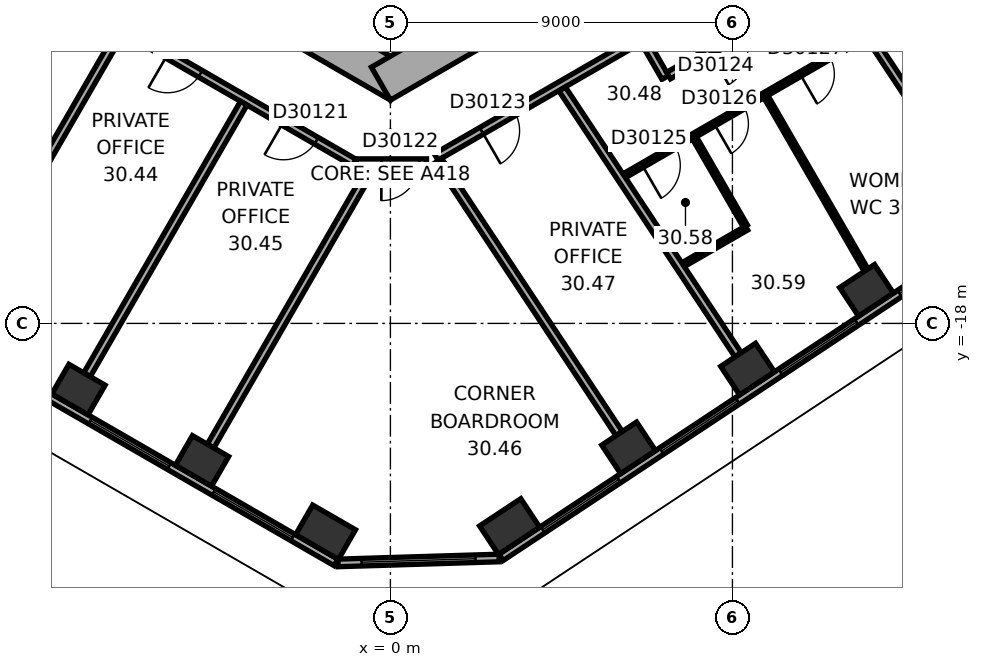
"""IFC4 building model, lengths in metres.
Left out: names, types, materials, properties, quantities, classifications, styles, units other than length and angle.
Written with IfcOpenShell. Run it as: python <this file> out.ifc"""

import sys

from ifc_helpers import new_model, si_unit, direction, frame, frame_2d, origin, origin_2d, place, context, subcontext, project, spatial, rectangle, extrude, element, fill, save


model = new_model("IFC4")
c1 = context("Model", 3, precision=1e-05, world=origin(), true_north=direction((0.0, 1.0)))
c2 = subcontext(c1, "Body", "Model", "MODEL_VIEW")
j1 = project(units=[si_unit("LENGTHUNIT", "METRE"), si_unit("PLANEANGLEUNIT", "RADIAN")], contexts=[c1])
p1 = place(None, origin())
s1 = spatial("IfcSite", under=j1, at=p1, CompositionType="ELEMENT")
p2 = place(p1, origin())
s2 = spatial("IfcBuilding", under=s1, at=p2, CompositionType="ELEMENT")
p3 = place(p2, frame((0.0, 0.0, 124.4)))
s3 = spatial("IfcBuildingStorey", under=s2, at=p3, CompositionType="ELEMENT", Elevation=124.4)
for number, where, z_axis, x_axis in (
    (1, (-8.208, -19.74, 0.0), (0.0, 0.0, 1.0), (0.866, -0.5, 0.0)),
    (2, (-4.958, -21.617, 0.0), (0.0, 0.0, 1.0), (0.866, -0.5, 0.0)),
):
    element("IfcColumn", number, at=place(p3, frame(where, z_axis=z_axis, x_axis=x_axis)), inside=s3, PredefinedType="COLUMN", context=c2, shape_type="SweptSolid", body=[
        extrude(rectangle(XDim=1.1, YDim=0.9, at=origin_2d()), origin(), (0.0, 0.0, 1.0), 3.7),
    ])
for number, where, z_axis, x_axis in (
    (3, (-1.706, -23.494, 0.0), (0.0, 0.0, 1.0), (0.866, -0.5, 0.0)),
    (4, (3.137, -23.346, 0.0), (0.0, 0.0, 1.0), (0.834, 0.552, 0.0)),
):
    element("IfcColumn", number, at=place(p3, frame(where, z_axis=z_axis, x_axis=x_axis)), inside=s3, PredefinedType="COLUMN", context=c2, shape_type="SweptSolid", body=[
        extrude(rectangle(XDim=1.3, YDim=0.9, at=origin_2d()), origin(), (0.0, 0.0, 1.0), 3.7),
    ])
for number, where, z_axis, x_axis in (
    (5, (6.268, -21.274, 0.0), (0.0, 0.0, 1.0), (0.834, 0.552, 0.0)),
    (6, (9.398, -19.202, 0.0), (0.0, 0.0, 1.0), (0.834, 0.552, 0.0)),
    (7, (12.529, -17.13, 0.0), (0.0, 0.0, 1.0), (0.834, 0.552, 0.0)),
):
    element("IfcColumn", number, at=place(p3, frame(where, z_axis=z_axis, x_axis=x_axis)), inside=s3, PredefinedType="COLUMN", context=c2, shape_type="SweptSolid", body=[
        extrude(rectangle(XDim=1.1, YDim=0.9, at=origin_2d()), origin(), (0.0, 0.0, 1.0), 3.7),
    ])
p4 = place(p3, frame((-10.25, -5.629, 0.0), z_axis=(0.0, 0.0, 1.0), x_axis=(0.866022616891, -0.50000482701, 0.0)))
e8 = element("IfcWall", 8, at=p4, inside=s3, PredefinedType="SHEAR", context=c2, shape_type="SweptSolid", body=[
    extrude(rectangle(XDim=12.125, YDim=1.0, at=frame_2d((6.062, 0.0))), origin(), (0.0, 0.0, 1.0), 3.7),
])
p5 = place(p4, frame((6.262, 0.0, 0.0)))
e9 = element("IfcOpeningElement", 9, at=p5, cuts=e8, PredefinedType="OPENING", context=c2, shape_type="SweptSolid", body=[
    extrude(rectangle(XDim=1.5, YDim=2.1, at=frame_2d((0.75, 1.05))), frame((0.0, 0.51, 0.0), z_axis=(0.0, -1.0, 0.0), x_axis=(1.0, 0.0, 0.0)), (0.0, 0.0, 1.0), 1.02),
])
p6 = place(p4, frame((1.812, 0.0, 0.0)))
e10 = element("IfcOpeningElement", 10, at=p6, cuts=e8, PredefinedType="OPENING", context=c2, shape_type="SweptSolid", body=[
    extrude(rectangle(XDim=0.9, YDim=2.1, at=frame_2d((0.45, 1.05))), frame((0.0, 0.51, 0.0), z_axis=(0.0, -1.0, 0.0), x_axis=(1.0, 0.0, 0.0)), (0.0, 0.0, 1.0), 1.02),
])
p7 = place(p4, frame((4.412, 0.0, 0.0)))
e11 = element("IfcOpeningElement", 11, at=p7, cuts=e8, PredefinedType="OPENING", context=c2, shape_type="SweptSolid", body=[
    extrude(rectangle(XDim=0.9, YDim=2.1, at=frame_2d((0.45, 1.05))), frame((0.0, 0.51, 0.0), z_axis=(0.0, -1.0, 0.0), x_axis=(1.0, 0.0, 0.0)), (0.0, 0.0, 1.0), 1.02),
])
p8 = place(p3, frame((-0.25, -11.691, 0.0), z_axis=(0.0, 0.0, 1.0), x_axis=(0.866022616891, 0.50000482701, 0.0)))
e12 = element("IfcWall", 12, at=p8, inside=s3, PredefinedType="SHEAR", context=c2, shape_type="SweptSolid", body=[
    extrude(rectangle(XDim=12.125, YDim=1.0, at=frame_2d((6.062, 0.0))), origin(), (0.0, 0.0, 1.0), 3.7),
])
p9 = place(p8, frame((4.012, 0.0, 0.0)))
e13 = element("IfcOpeningElement", 13, at=p9, cuts=e12, PredefinedType="OPENING", context=c2, shape_type="SweptSolid", body=[
    extrude(rectangle(XDim=0.9, YDim=2.1, at=frame_2d((0.45, 1.05))), frame((0.0, 0.51, 0.0), z_axis=(0.0, -1.0, 0.0), x_axis=(1.0, 0.0, 0.0)), (0.0, 0.0, 1.0), 1.02),
])
p10 = place(p8, frame((7.812, 0.0, 0.0)))
e14 = element("IfcOpeningElement", 14, at=p10, cuts=e12, PredefinedType="OPENING", context=c2, shape_type="SweptSolid", body=[
    extrude(rectangle(XDim=1.1, YDim=2.1, at=frame_2d((0.55, 1.05))), frame((0.0, 0.51, 0.0), z_axis=(0.0, -1.0, 0.0), x_axis=(1.0, 0.0, 0.0)), (0.0, 0.0, 1.0), 1.02),
])
p11 = place(p3, frame((-18.789, -14.267, 0.0), z_axis=(0.0, 0.0, 1.0), x_axis=(0.866023315909, -0.500003616288, 0.0)))
e15 = element("IfcWall", 15, at=p11, inside=s3, PredefinedType="STANDARD", context=c2, shape_type="SweptSolid", body=[
    extrude(rectangle(XDim=20.044, YDim=0.2, at=frame_2d((10.022, 0.0))), origin(), (0.0, 0.0, 1.0), 3.7),
])
p12 = place(p11, frame((1.314, 0.0, 0.9)))
e16 = element("IfcOpeningElement", 16, at=p12, cuts=e15, PredefinedType="OPENING", context=c2, shape_type="SweptSolid", body=[
    extrude(rectangle(XDim=2.4, YDim=2.0, at=frame_2d((1.2, 1.0))), frame((0.0, 0.11, 0.0), z_axis=(0.0, -1.0, 0.0), x_axis=(1.0, 0.0, 0.0)), (0.0, 0.0, 1.0), 0.22),
])
p13 = place(p11, frame((5.069, 0.0, 0.9)))
e17 = element("IfcOpeningElement", 17, at=p13, cuts=e15, PredefinedType="OPENING", context=c2, shape_type="SweptSolid", body=[
    extrude(rectangle(XDim=2.4, YDim=2.0, at=frame_2d((1.2, 1.0))), frame((0.0, 0.11, 0.0), z_axis=(0.0, -1.0, 0.0), x_axis=(1.0, 0.0, 0.0)), (0.0, 0.0, 1.0), 0.22),
])
p14 = place(p11, frame((8.823, 0.0, 0.9)))
e18 = element("IfcOpeningElement", 18, at=p14, cuts=e15, PredefinedType="OPENING", context=c2, shape_type="SweptSolid", body=[
    extrude(rectangle(XDim=2.4, YDim=2.0, at=frame_2d((1.2, 1.0))), frame((0.0, 0.11, 0.0), z_axis=(0.0, -1.0, 0.0), x_axis=(1.0, 0.0, 0.0)), (0.0, 0.0, 1.0), 0.22),
])
p15 = place(p11, frame((12.577, 0.0, 0.9)))
e19 = element("IfcOpeningElement", 19, at=p15, cuts=e15, PredefinedType="OPENING", context=c2, shape_type="SweptSolid", body=[
    extrude(rectangle(XDim=2.4, YDim=2.0, at=frame_2d((1.2, 1.0))), frame((0.0, 0.11, 0.0), z_axis=(0.0, -1.0, 0.0), x_axis=(1.0, 0.0, 0.0)), (0.0, 0.0, 1.0), 0.22),
])
p16 = place(p11, frame((16.331, 0.0, 0.9)))
e20 = element("IfcOpeningElement", 20, at=p16, cuts=e15, PredefinedType="OPENING", context=c2, shape_type="SweptSolid", body=[
    extrude(rectangle(XDim=2.4, YDim=2.0, at=frame_2d((1.2, 1.0))), frame((0.0, 0.11, 0.0), z_axis=(0.0, -1.0, 0.0), x_axis=(1.0, 0.0, 0.0)), (0.0, 0.0, 1.0), 0.22),
])
p17 = place(p3, frame((-1.378, -24.302, 0.0), z_axis=(0.0, 0.0, 1.0), x_axis=(0.999533857267, 0.030529791629, 0.0)))
e21 = element("IfcWall", 21, at=p17, inside=s3, PredefinedType="STANDARD", context=c2, shape_type="SweptSolid", body=[
    extrude(rectangle(XDim=4.238, YDim=0.2, at=frame_2d((2.119, 0.0))), origin(), (0.0, 0.0, 1.0), 3.7),
])
p18 = place(p17, frame((0.619, 0.0, 0.9)))
e22 = element("IfcOpeningElement", 22, at=p18, cuts=e21, PredefinedType="OPENING", context=c2, shape_type="SweptSolid", body=[
    extrude(rectangle(XDim=3.0, YDim=2.0, at=frame_2d((1.5, 1.0))), frame((0.0, 0.11, 0.0), z_axis=(0.0, -1.0, 0.0), x_axis=(1.0, 0.0, 0.0)), (0.0, 0.0, 1.0), 0.22),
])
p19 = place(p3, frame((2.911, -24.156, 0.0), z_axis=(0.0, 0.0, 1.0), x_axis=(0.833882163564, 0.551942512668, 0.0)))
e23 = element("IfcWall", 23, at=p19, inside=s3, PredefinedType="STANDARD", context=c2, shape_type="SweptSolid", body=[
    extrude(rectangle(XDim=20.044, YDim=0.2, at=frame_2d((10.022, 0.0))), origin(), (0.0, 0.0, 1.0), 3.7),
])
p20 = place(p19, frame((1.313, 0.0, 0.9)))
e24 = element("IfcOpeningElement", 24, at=p20, cuts=e23, PredefinedType="OPENING", context=c2, shape_type="SweptSolid", body=[
    extrude(rectangle(XDim=2.4, YDim=2.0, at=frame_2d((1.2, 1.0))), frame((0.0, 0.11, 0.0), z_axis=(0.0, -1.0, 0.0), x_axis=(1.0, 0.0, 0.0)), (0.0, 0.0, 1.0), 0.22),
])
p21 = place(p19, frame((5.067, 0.0, 0.9)))
e25 = element("IfcOpeningElement", 25, at=p21, cuts=e23, PredefinedType="OPENING", context=c2, shape_type="SweptSolid", body=[
    extrude(rectangle(XDim=2.4, YDim=2.0, at=frame_2d((1.2, 1.0))), frame((0.0, 0.11, 0.0), z_axis=(0.0, -1.0, 0.0), x_axis=(1.0, 0.0, 0.0)), (0.0, 0.0, 1.0), 0.22),
])
p22 = place(p19, frame((8.821, 0.0, 0.9)))
e26 = element("IfcOpeningElement", 26, at=p22, cuts=e23, PredefinedType="OPENING", context=c2, shape_type="SweptSolid", body=[
    extrude(rectangle(XDim=2.4, YDim=2.0, at=frame_2d((1.2, 1.0))), frame((0.0, 0.11, 0.0), z_axis=(0.0, -1.0, 0.0), x_axis=(1.0, 0.0, 0.0)), (0.0, 0.0, 1.0), 0.22),
])
p23 = place(p19, frame((12.575, 0.0, 0.9)))
e27 = element("IfcOpeningElement", 27, at=p23, cuts=e23, PredefinedType="OPENING", context=c2, shape_type="SweptSolid", body=[
    extrude(rectangle(XDim=2.4, YDim=2.0, at=frame_2d((1.2, 1.0))), frame((0.0, 0.11, 0.0), z_axis=(0.0, -1.0, 0.0), x_axis=(1.0, 0.0, 0.0)), (0.0, 0.0, 1.0), 0.22),
])
p24 = place(p19, frame((16.329, 0.0, 0.9)))
e28 = element("IfcOpeningElement", 28, at=p24, cuts=e23, PredefinedType="OPENING", context=c2, shape_type="SweptSolid", body=[
    extrude(rectangle(XDim=2.4, YDim=2.0, at=frame_2d((1.2, 1.0))), frame((0.0, 0.11, 0.0), z_axis=(0.0, -1.0, 0.0), x_axis=(1.0, 0.0, 0.0)), (0.0, 0.0, 1.0), 0.22),
])
p25 = place(p3, frame((-11.415, -7.728, 0.0), z_axis=(0.0, 0.0, 1.0), x_axis=(0.866022749921, -0.500004596598, 0.0)))
e29 = element("IfcWall", 29, at=p25, inside=s3, PredefinedType="PARTITIONING", context=c2, shape_type="SweptSolid", body=[
    extrude(rectangle(XDim=12.084, YDim=0.2, at=frame_2d((6.042, 0.0))), origin(), (0.0, 0.0, 1.0), 3.42),
])
p26 = place(p25, frame((2.652, 0.0, 0.0)))
e30 = element("IfcOpeningElement", 30, at=p26, cuts=e29, PredefinedType="OPENING", context=c2, shape_type="SweptSolid", body=[
    extrude(rectangle(XDim=1.0, YDim=2.1, at=frame_2d((0.5, 1.05))), frame((0.0, 0.11, 0.0), z_axis=(0.0, -1.0, 0.0), x_axis=(1.0, 0.0, 0.0)), (0.0, 0.0, 1.0), 0.22),
])
p27 = place(p25, frame((6.406, 0.0, 0.0)))
e31 = element("IfcOpeningElement", 31, at=p27, cuts=e29, PredefinedType="OPENING", context=c2, shape_type="SweptSolid", body=[
    extrude(rectangle(XDim=1.0, YDim=2.1, at=frame_2d((0.5, 1.05))), frame((0.0, 0.11, 0.0), z_axis=(0.0, -1.0, 0.0), x_axis=(1.0, 0.0, 0.0)), (0.0, 0.0, 1.0), 0.22),
])
p28 = place(p25, frame((9.934, 0.0, 0.0)))
e32 = element("IfcOpeningElement", 32, at=p28, cuts=e29, PredefinedType="OPENING", context=c2, shape_type="SweptSolid", body=[
    extrude(rectangle(XDim=1.0, YDim=2.1, at=frame_2d((0.5, 1.05))), frame((0.0, 0.11, 0.0), z_axis=(0.0, -1.0, 0.0), x_axis=(1.0, 0.0, 0.0)), (0.0, 0.0, 1.0), 0.22),
])
p29 = place(p3, frame((-11.235, -17.474, 0.0), z_axis=(0.0, 0.0, 1.0), x_axis=(0.499996545922, 0.866027397988, 0.0)))
e33 = element("IfcWall", 33, at=p29, inside=s3, PredefinedType="PARTITIONING", context=c2, shape_type="SweptSolid", body=[
    extrude(rectangle(XDim=8.25, YDim=0.2, at=frame_2d((4.125, 0.0))), origin(), (0.0, 0.0, 1.0), 2.87),
])
p30 = place(p3, frame((-7.984, -19.351, 0.0), z_axis=(0.0, 0.0, 1.0), x_axis=(0.500009360108, 0.866019999656, 0.0)))
e34 = element("IfcWall", 34, at=p30, inside=s3, PredefinedType="PARTITIONING", context=c2, shape_type="SweptSolid", body=[
    extrude(rectangle(XDim=8.25, YDim=0.2, at=frame_2d((4.125, 0.0))), origin(), (0.0, 0.0, 1.0), 3.42),
])
p31 = place(p3, frame((-4.732, -21.228, 0.0), z_axis=(0.0, 0.0, 1.0), x_axis=(0.500000843414, 0.866024916838, 0.0)))
e35 = element("IfcWall", 35, at=p31, inside=s3, PredefinedType="PARTITIONING", context=c2, shape_type="SweptSolid", body=[
    extrude(rectangle(XDim=8.452, YDim=0.2, at=frame_2d((4.226, 0.0))), origin(), (0.0, 0.0, 1.0), 3.42),
])
p32 = place(p3, frame((-0.91, -13.77, 0.0), z_axis=(0.0, 0.0, 1.0), x_axis=(1.0, 0.0, 0.0)))
e36 = element("IfcWall", 36, at=p32, inside=s3, PredefinedType="PARTITIONING", context=c2, shape_type="SweptSolid", body=[
    extrude(rectangle(XDim=1.86, YDim=0.2, at=frame_2d((0.93, 0.0))), origin(), (0.0, 0.0, 1.0), 3.42),
])
p33 = place(p32, frame((0.672, 0.0, 0.0)))
e37 = element("IfcOpeningElement", 37, at=p33, cuts=e36, PredefinedType="OPENING", context=c2, shape_type="SweptSolid", body=[
    extrude(rectangle(XDim=1.0, YDim=2.1, at=frame_2d((0.5, 1.05))), frame((0.0, 0.11, 0.0), z_axis=(0.0, -1.0, 0.0), x_axis=(1.0, 0.0, 0.0)), (0.0, 0.0, 1.0), 0.22),
])
p34 = place(p3, frame((1.204, -13.623, 0.0), z_axis=(0.0, 0.0, 1.0), x_axis=(0.866031867142, 0.49998880497, 0.0)))
e38 = element("IfcWall", 38, at=p34, inside=s3, PredefinedType="PARTITIONING", context=c2, shape_type="SweptSolid", body=[
    extrude(rectangle(XDim=6.268, YDim=0.2, at=frame_2d((3.134, 0.0))), origin(), (0.0, 0.0, 1.0), 3.42),
])
p35 = place(p34, frame((1.381, 0.0, 0.0)))
e39 = element("IfcOpeningElement", 39, at=p35, cuts=e38, PredefinedType="OPENING", context=c2, shape_type="SweptSolid", body=[
    extrude(rectangle(XDim=1.0, YDim=2.1, at=frame_2d((0.5, 1.05))), frame((0.0, 0.11, 0.0), z_axis=(0.0, -1.0, 0.0), x_axis=(1.0, 0.0, 0.0)), (0.0, 0.0, 1.0), 0.22),
])
p36 = place(p3, frame((6.02, -20.899, 0.0), z_axis=(0.0, 0.0, 1.0), x_axis=(-0.551943990108, 0.833881185651, 0.0)))
e40 = element("IfcWall", 40, at=p36, inside=s3, PredefinedType="PARTITIONING", context=c2, shape_type="SweptSolid", body=[
    extrude(rectangle(XDim=8.615, YDim=0.2, at=frame_2d((4.308, 0.0))), origin(), (0.0, 0.0, 1.0), 3.42),
])
p37 = place(p3, frame((6.152, -14.116, 0.0), z_axis=(0.0, 0.0, 1.0), x_axis=(0.866026788224, 0.499997602072, 0.0)))
e41 = element("IfcWall", 41, at=p37, inside=s3, PredefinedType="PARTITIONING", context=c2, shape_type="SweptSolid", body=[
    extrude(rectangle(XDim=7.322, YDim=0.12, at=frame_2d((3.661, 0.0))), origin(), (0.0, 0.0, 1.0), 3.42),
])
p38 = place(p37, frame((0.55, 0.0, 0.0)))
e42 = element("IfcOpeningElement", 42, at=p38, cuts=e41, PredefinedType="OPENING", context=c2, shape_type="SweptSolid", body=[
    extrude(rectangle(XDim=1.0, YDim=2.1, at=frame_2d((0.5, 1.05))), frame((0.0, 0.07, 0.0), z_axis=(0.0, -1.0, 0.0), x_axis=(1.0, 0.0, 0.0)), (0.0, 0.0, 1.0), 0.14),
])
p39 = place(p37, frame((2.736, 0.0, 0.0)))
e43 = element("IfcOpeningElement", 43, at=p39, cuts=e41, PredefinedType="OPENING", context=c2, shape_type="SweptSolid", body=[
    extrude(rectangle(XDim=0.9, YDim=2.1, at=frame_2d((0.45, 1.05))), frame((0.0, 0.07, 0.0), z_axis=(0.0, -1.0, 0.0), x_axis=(1.0, 0.0, 0.0)), (0.0, 0.0, 1.0), 0.14),
])
p40 = place(p37, frame((5.347, 0.0, 0.0)))
e44 = element("IfcOpeningElement", 44, at=p40, cuts=e41, PredefinedType="OPENING", context=c2, shape_type="SweptSolid", body=[
    extrude(rectangle(XDim=0.9, YDim=2.1, at=frame_2d((0.45, 1.05))), frame((0.0, 0.07, 0.0), z_axis=(0.0, -1.0, 0.0), x_axis=(1.0, 0.0, 0.0)), (0.0, 0.0, 1.0), 0.14),
])
p41 = place(p3, frame((6.682, -10.576, 0.0), z_axis=(0.0, 0.0, 1.0), x_axis=(0.499978356969, -0.866037899034, 0.0)))
e45 = element("IfcWall", 45, at=p41, inside=s3, PredefinedType="PARTITIONING", context=c2, shape_type="SweptSolid", body=[
    extrude(rectangle(XDim=1.101, YDim=0.2, at=frame_2d((0.551, 0.0))), origin(), (0.0, 0.0, 1.0), 3.42),
])
p42 = place(p3, frame((7.319, -11.479, 0.0), z_axis=(0.0, 0.0, 1.0), x_axis=(0.866038154057, 0.49997791523, 0.0)))
e46 = element("IfcWall", 46, at=p42, inside=s3, PredefinedType="PARTITIONING", context=c2, shape_type="SweptSolid", body=[
    extrude(rectangle(XDim=3.502, YDim=0.2, at=frame_2d((1.751, 0.0))), origin(), (0.0, 0.0, 1.0), 3.42),
])
p43 = place(p42, frame((1.251, 0.0, 0.0)))
e47 = element("IfcOpeningElement", 47, at=p43, cuts=e46, PredefinedType="OPENING", context=c2, shape_type="SweptSolid", body=[
    extrude(rectangle(XDim=1.0, YDim=2.1, at=frame_2d((0.5, 1.05))), frame((0.0, 0.11, 0.0), z_axis=(0.0, -1.0, 0.0), x_axis=(1.0, 0.0, 0.0)), (0.0, 0.0, 1.0), 0.22),
])
p44 = place(p3, frame((7.7, -16.456, 0.0), z_axis=(0.0, 0.0, 1.0), x_axis=(0.86603803935, 0.499978113919, 0.0)))
e48 = element("IfcWall", 48, at=p44, inside=s3, PredefinedType="PARTITIONING", context=c2, shape_type="SweptSolid", body=[
    extrude(rectangle(XDim=1.929, YDim=0.12, at=frame_2d((0.964, 0.0))), origin(), (0.0, 0.0, 1.0), 3.42),
])
p45 = place(p3, frame((9.15, -18.827, 0.0), z_axis=(0.0, 0.0, 1.0), x_axis=(-0.551942527453, 0.833882153777, 0.0)))
e49 = element("IfcWall", 49, at=p45, inside=s3, PredefinedType="PARTITIONING", context=c2, shape_type="SweptSolid", body=[
    extrude(rectangle(XDim=8.386, YDim=0.2, at=frame_2d((4.193, 0.0))), origin(), (0.0, 0.0, 1.0), 2.87),
])
p46 = place(p3, frame((9.34, -15.439, 0.0), z_axis=(0.0, 0.0, 1.0), x_axis=(-0.500048396672, 0.86599746015, 0.0)))
e50 = element("IfcWall", 50, at=p46, inside=s3, PredefinedType="PARTITIONING", context=c2, shape_type="SweptSolid", body=[
    extrude(rectangle(XDim=2.68, YDim=0.12, at=frame_2d((1.34, 0.0))), origin(), (0.0, 0.0, 1.0), 3.42),
])
p47 = place(p3, frame((12.517, -16.599, 0.0), z_axis=(0.0, 0.0, 1.0), x_axis=(-0.500013727357, 0.866017478146, 0.0)))
e51 = element("IfcWall", 51, at=p47, inside=s3, PredefinedType="PARTITIONING", context=c2, shape_type="SweptSolid", body=[
    extrude(rectangle(XDim=5.272, YDim=0.12, at=frame_2d((2.636, 0.0))), origin(), (0.0, 0.0, 1.0), 3.42),
])
p48 = place(p3, frame((15.411, -14.683, 0.0), z_axis=(0.0, 0.0, 1.0), x_axis=(-0.551932106251, 0.833889051427, 0.0)))
e52 = element("IfcWall", 52, at=p48, inside=s3, PredefinedType="PARTITIONING", context=c2, shape_type="SweptSolid", body=[
    extrude(rectangle(XDim=7.926, YDim=0.2, at=frame_2d((3.963, 0.0))), origin(), (0.0, 0.0, 1.0), 2.87),
])
p49 = place(p15, origin())
e53 = element("IfcWindow", 53, at=p49, inside=s3, PartitioningType="SINGLE_PANEL", PredefinedType="WINDOW", context=c2, shape_type="SweptSolid", body=[
    extrude(rectangle(XDim=2.4, YDim=2.0, at=frame_2d((1.2, 1.0))), frame((0.0, 0.03, 0.0), z_axis=(0.0, -1.0, 0.0), x_axis=(1.0, 0.0, 0.0)), (0.0, 0.0, 1.0), 0.06),
])
fill(e19, e53)
p50 = place(p16, origin())
e54 = element("IfcWindow", 54, at=p50, inside=s3, PartitioningType="SINGLE_PANEL", PredefinedType="WINDOW", context=c2, shape_type="SweptSolid", body=[
    extrude(rectangle(XDim=2.4, YDim=2.0, at=frame_2d((1.2, 1.0))), frame((0.0, 0.03, 0.0), z_axis=(0.0, -1.0, 0.0), x_axis=(1.0, 0.0, 0.0)), (0.0, 0.0, 1.0), 0.06),
])
fill(e20, e54)
p51 = place(p18, origin())
e55 = element("IfcWindow", 55, at=p51, inside=s3, PartitioningType="SINGLE_PANEL", PredefinedType="WINDOW", context=c2, shape_type="SweptSolid", body=[
    extrude(rectangle(XDim=3.0, YDim=2.0, at=frame_2d((1.5, 1.0))), frame((0.0, 0.03, 0.0), z_axis=(0.0, -1.0, 0.0), x_axis=(1.0, 0.0, 0.0)), (0.0, 0.0, 1.0), 0.06),
])
fill(e22, e55)
p52 = place(p20, origin())
e56 = element("IfcWindow", 56, at=p52, inside=s3, PartitioningType="SINGLE_PANEL", PredefinedType="WINDOW", context=c2, shape_type="SweptSolid", body=[
    extrude(rectangle(XDim=2.4, YDim=2.0, at=frame_2d((1.2, 1.0))), frame((0.0, 0.03, 0.0), z_axis=(0.0, -1.0, 0.0), x_axis=(1.0, 0.0, 0.0)), (0.0, 0.0, 1.0), 0.06),
])
fill(e24, e56)
p53 = place(p21, origin())
e57 = element("IfcWindow", 57, at=p53, inside=s3, PartitioningType="SINGLE_PANEL", PredefinedType="WINDOW", context=c2, shape_type="SweptSolid", body=[
    extrude(rectangle(XDim=2.4, YDim=2.0, at=frame_2d((1.2, 1.0))), frame((0.0, 0.03, 0.0), z_axis=(0.0, -1.0, 0.0), x_axis=(1.0, 0.0, 0.0)), (0.0, 0.0, 1.0), 0.06),
])
fill(e25, e57)
p54 = place(p22, origin())
e58 = element("IfcWindow", 58, at=p54, inside=s3, PartitioningType="SINGLE_PANEL", PredefinedType="WINDOW", context=c2, shape_type="SweptSolid", body=[
    extrude(rectangle(XDim=2.4, YDim=2.0, at=frame_2d((1.2, 1.0))), frame((0.0, 0.03, 0.0), z_axis=(0.0, -1.0, 0.0), x_axis=(1.0, 0.0, 0.0)), (0.0, 0.0, 1.0), 0.06),
])
fill(e26, e58)
p55 = place(p23, origin())
e59 = element("IfcWindow", 59, at=p55, inside=s3, PartitioningType="SINGLE_PANEL", PredefinedType="WINDOW", context=c2, shape_type="SweptSolid", body=[
    extrude(rectangle(XDim=2.4, YDim=2.0, at=frame_2d((1.2, 1.0))), frame((0.0, 0.03, 0.0), z_axis=(0.0, -1.0, 0.0), x_axis=(1.0, 0.0, 0.0)), (0.0, 0.0, 1.0), 0.06),
])
fill(e27, e59)
p56 = place(p27, origin())
e60 = element("IfcDoor", 60, at=p56, inside=s3, OperationType="SINGLE_SWING_LEFT", PredefinedType="DOOR", context=c2, shape_type="SweptSolid", body=[
    extrude(rectangle(XDim=1.0, YDim=2.1, at=frame_2d((0.5, 1.05))), frame((0.0, 0.025, 0.0), z_axis=(0.0, -1.0, 0.0), x_axis=(1.0, 0.0, 0.0)), (0.0, 0.0, 1.0), 0.05),
])
fill(e31, e60)
p57 = place(p28, origin())
e61 = element("IfcDoor", 61, at=p57, inside=s3, OperationType="SINGLE_SWING_LEFT", PredefinedType="DOOR", context=c2, shape_type="SweptSolid", body=[
    extrude(rectangle(XDim=1.0, YDim=2.1, at=frame_2d((0.5, 1.05))), frame((0.0, 0.025, 0.0), z_axis=(0.0, -1.0, 0.0), x_axis=(1.0, 0.0, 0.0)), (0.0, 0.0, 1.0), 0.05),
])
fill(e32, e61)
p58 = place(p33, origin())
e62 = element("IfcDoor", 62, at=p58, inside=s3, OperationType="SINGLE_SWING_LEFT", PredefinedType="DOOR", context=c2, shape_type="SweptSolid", body=[
    extrude(rectangle(XDim=1.0, YDim=2.1, at=frame_2d((0.5, 1.05))), frame((0.0, 0.025, 0.0), z_axis=(0.0, -1.0, 0.0), x_axis=(1.0, 0.0, 0.0)), (0.0, 0.0, 1.0), 0.05),
])
fill(e37, e62)
p59 = place(p35, origin())
e63 = element("IfcDoor", 63, at=p59, inside=s3, OperationType="SINGLE_SWING_LEFT", PredefinedType="DOOR", context=c2, shape_type="SweptSolid", body=[
    extrude(rectangle(XDim=1.0, YDim=2.1, at=frame_2d((0.5, 1.05))), frame((0.0, 0.025, 0.0), z_axis=(0.0, -1.0, 0.0), x_axis=(1.0, 0.0, 0.0)), (0.0, 0.0, 1.0), 0.05),
])
fill(e39, e63)
p60 = place(p38, origin())
e64 = element("IfcDoor", 64, at=p60, inside=s3, OperationType="SINGLE_SWING_LEFT", PredefinedType="DOOR", context=c2, shape_type="SweptSolid", body=[
    extrude(rectangle(XDim=1.0, YDim=2.1, at=frame_2d((0.5, 1.05))), frame((0.0, 0.025, 0.0), z_axis=(0.0, -1.0, 0.0), x_axis=(1.0, 0.0, 0.0)), (0.0, 0.0, 1.0), 0.05),
])
fill(e42, e64)
p61 = place(p39, origin())
e65 = element("IfcDoor", 65, at=p61, inside=s3, OperationType="SINGLE_SWING_LEFT", PredefinedType="DOOR", context=c2, shape_type="SweptSolid", body=[
    extrude(rectangle(XDim=0.9, YDim=2.1, at=frame_2d((0.45, 1.05))), frame((0.0, 0.025, 0.0), z_axis=(0.0, -1.0, 0.0), x_axis=(1.0, 0.0, 0.0)), (0.0, 0.0, 1.0), 0.05),
])
fill(e43, e65)
p62 = place(p40, origin())
e66 = element("IfcDoor", 66, at=p62, inside=s3, OperationType="SINGLE_SWING_LEFT", PredefinedType="DOOR", context=c2, shape_type="SweptSolid", body=[
    extrude(rectangle(XDim=0.9, YDim=2.1, at=frame_2d((0.45, 1.05))), frame((0.0, 0.025, 0.0), z_axis=(0.0, -1.0, 0.0), x_axis=(1.0, 0.0, 0.0)), (0.0, 0.0, 1.0), 0.05),
])
fill(e44, e66)
save(model, sys.argv[1])
